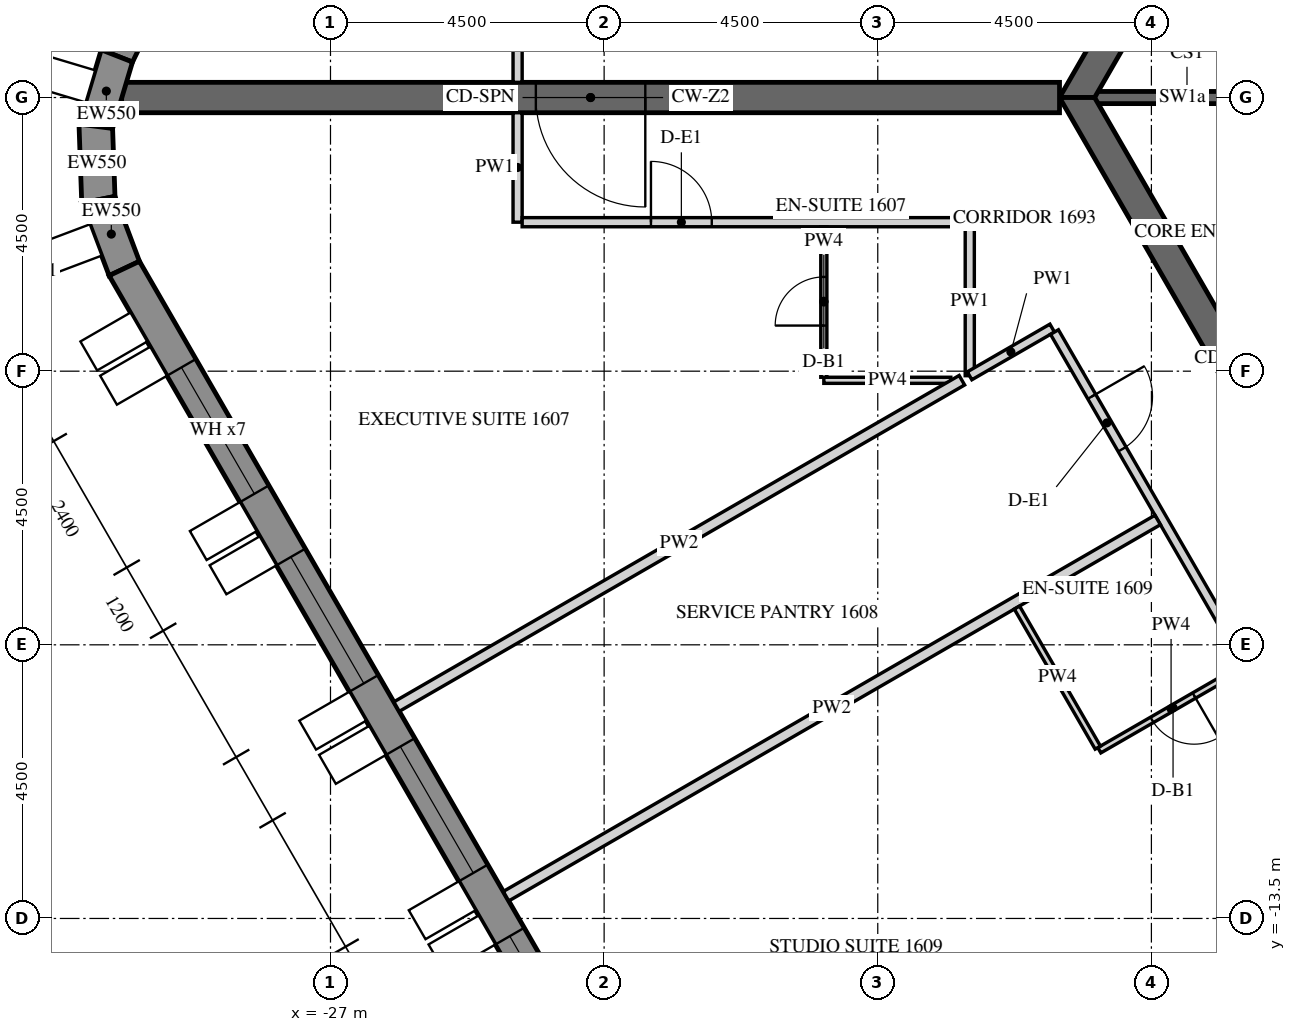
"""IFC4 building model, lengths in metres.
Left out: names, types, materials, properties, quantities, classifications, styles, units other than length and angle.
Written with IfcOpenShell. Run it as: python <this file> out.ifc"""

import sys

from ifc_helpers import new_model, si_unit, direction, frame, frame_2d, origin, place, context, subcontext, project, spatial, polyline, rectangle, outline, extrude, element, fill, save


model = new_model("IFC4")
c1 = context("Model", 3, precision=1e-05, world=origin(), true_north=direction((0.0, 1.0)))
c2 = subcontext(c1, "Body", "Model", "MODEL_VIEW")
j1 = project(units=[si_unit("LENGTHUNIT", "METRE"), si_unit("PLANEANGLEUNIT", "RADIAN")], contexts=[c1])
p1 = place(None, origin())
s1 = spatial("IfcSite", under=j1, at=p1, CompositionType="ELEMENT")
p2 = place(p1, origin())
s2 = spatial("IfcBuilding", under=s1, at=p2, CompositionType="ELEMENT")
p3 = place(p2, frame((0.0, 0.0, 207.3)))
s3 = spatial("IfcBuildingStorey", under=s2, at=p3, CompositionType="ELEMENT", Elevation=207.3)
p4 = place(p3, frame((-18.345, 25.633, -0.15), z_axis=(0.0, 0.0, 1.0), x_axis=(-0.43837181828, -0.898793718791, 0.0)))
e1 = element("IfcWall", 1, at=p4, inside=s3, PredefinedType="SOLIDWALL", context=c2, shape_type="SweptSolid", body=[
    extrude(outline(polyline([(-0.026, -0.275), (27.78, -0.275), (27.735, 0.275), (0.026, 0.275), (-0.026, -0.275)])), origin(), (0.0, 0.0, 1.0), 3.9),
])
p5 = place(p4, frame((1.879, 0.0, 1.05)))
e2 = element("IfcOpeningElement", 2, at=p5, cuts=e1, PredefinedType="OPENING", context=c2, shape_type="SweptSolid", body=[
    extrude(rectangle(XDim=2.4, YDim=2.4, at=frame_2d((1.2, 1.2))), frame((0.0, 0.285, 0.0), z_axis=(0.0, -1.0, 0.0), x_axis=(1.0, 0.0, 0.0)), (0.0, 0.0, 1.0), 0.57),
])
p6 = place(p4, frame((5.479, 0.0, 1.05)))
e3 = element("IfcOpeningElement", 3, at=p6, cuts=e1, PredefinedType="OPENING", context=c2, shape_type="SweptSolid", body=[
    extrude(rectangle(XDim=2.4, YDim=2.4, at=frame_2d((1.2, 1.2))), frame((0.0, 0.285, 0.0), z_axis=(0.0, -1.0, 0.0), x_axis=(1.0, 0.0, 0.0)), (0.0, 0.0, 1.0), 0.57),
])
p7 = place(p4, frame((9.079, 0.0, 1.05)))
e4 = element("IfcOpeningElement", 4, at=p7, cuts=e1, PredefinedType="OPENING", context=c2, shape_type="SweptSolid", body=[
    extrude(rectangle(XDim=2.4, YDim=2.4, at=frame_2d((1.2, 1.2))), frame((0.0, 0.285, 0.0), z_axis=(0.0, -1.0, 0.0), x_axis=(1.0, 0.0, 0.0)), (0.0, 0.0, 1.0), 0.57),
])
p8 = place(p4, frame((12.679, 0.0, 1.05)))
e5 = element("IfcOpeningElement", 5, at=p8, cuts=e1, PredefinedType="OPENING", context=c2, shape_type="SweptSolid", body=[
    extrude(rectangle(XDim=2.4, YDim=2.4, at=frame_2d((1.2, 1.2))), frame((0.0, 0.285, 0.0), z_axis=(0.0, -1.0, 0.0), x_axis=(1.0, 0.0, 0.0)), (0.0, 0.0, 1.0), 0.57),
])
p9 = place(p4, frame((16.279, 0.0, 1.05)))
e6 = element("IfcOpeningElement", 6, at=p9, cuts=e1, PredefinedType="OPENING", context=c2, shape_type="SweptSolid", body=[
    extrude(rectangle(XDim=2.4, YDim=2.4, at=frame_2d((1.2, 1.2))), frame((0.0, 0.285, 0.0), z_axis=(0.0, -1.0, 0.0), x_axis=(1.0, 0.0, 0.0)), (0.0, 0.0, 1.0), 0.57),
])
p10 = place(p4, frame((19.879, 0.0, 1.05)))
e7 = element("IfcOpeningElement", 7, at=p10, cuts=e1, PredefinedType="OPENING", context=c2, shape_type="SweptSolid", body=[
    extrude(rectangle(XDim=2.4, YDim=2.4, at=frame_2d((1.2, 1.2))), frame((0.0, 0.285, 0.0), z_axis=(0.0, -1.0, 0.0), x_axis=(1.0, 0.0, 0.0)), (0.0, 0.0, 1.0), 0.57),
])
p11 = place(p4, frame((23.479, 0.0, 1.05)))
e8 = element("IfcOpeningElement", 8, at=p11, cuts=e1, PredefinedType="OPENING", context=c2, shape_type="SweptSolid", body=[
    extrude(rectangle(XDim=2.4, YDim=2.4, at=frame_2d((1.2, 1.2))), frame((0.0, 0.285, 0.0), z_axis=(0.0, -1.0, 0.0), x_axis=(1.0, 0.0, 0.0)), (0.0, 0.0, 1.0), 0.57),
])
p12 = place(p3, frame((-30.513, 0.684, -0.15), z_axis=(0.0, 0.0, 1.0), x_axis=(-0.286736058109, -0.958009620505, 0.0)))
e9 = element("IfcWall", 9, at=p12, inside=s3, PredefinedType="SOLIDWALL", context=c2, shape_type="SweptSolid", body=[
    extrude(outline(polyline([(-0.022, -0.275), (1.253, -0.275), (1.163, 0.275), (0.022, 0.275), (-0.022, -0.275)])), origin(), (0.0, 0.0, 1.0), 3.9),
])
p13 = place(p3, frame((-30.86, -0.473, -0.15), z_axis=(0.0, 0.0, 1.0), x_axis=(0.03495638276, -0.999388838893, 0.0)))
e10 = element("IfcWall", 10, at=p13, inside=s3, PredefinedType="SOLIDWALL", context=c2, shape_type="SweptSolid", body=[
    extrude(outline(polyline([(-0.045, -0.275), (1.253, -0.275), (1.163, 0.275), (0.045, 0.275), (-0.045, -0.275)])), origin(), (0.0, 0.0, 1.0), 3.9),
])
p14 = place(p3, frame((-30.817, -1.681, -0.15), z_axis=(0.0, 0.0, 1.0), x_axis=(0.352850303963, -0.935679786569, 0.0)))
e11 = element("IfcWall", 11, at=p14, inside=s3, PredefinedType="SOLIDWALL", context=c2, shape_type="SweptSolid", body=[
    extrude(outline(polyline([(-0.045, -0.275), (1.23, -0.275), (1.186, 0.275), (0.045, 0.275), (-0.045, -0.275)])), origin(), (0.0, 0.0, 1.0), 3.9),
])
p15 = place(p3, frame((-30.391, -2.811, -0.15), z_axis=(0.0, 0.0, 1.0), x_axis=(0.499998569178, -0.866026229868, 0.0)))
e12 = element("IfcWall", 12, at=p15, inside=s3, PredefinedType="SOLIDWALL", context=c2, shape_type="SweptSolid", body=[
    extrude(outline(polyline([(-0.022, -0.275), (27.783, -0.275), (27.732, 0.275), (0.022, 0.275), (-0.022, -0.275)])), origin(), (0.0, 0.0, 1.0), 3.9),
])
p16 = place(p15, frame((1.879, 0.0, 1.05)))
e13 = element("IfcOpeningElement", 13, at=p16, cuts=e12, PredefinedType="OPENING", context=c2, shape_type="SweptSolid", body=[
    extrude(rectangle(XDim=2.4, YDim=2.4, at=frame_2d((1.2, 1.2))), frame((0.0, 0.285, 0.0), z_axis=(0.0, -1.0, 0.0), x_axis=(1.0, 0.0, 0.0)), (0.0, 0.0, 1.0), 0.57),
])
p17 = place(p15, frame((5.479, 0.0, 1.05)))
e14 = element("IfcOpeningElement", 14, at=p17, cuts=e12, PredefinedType="OPENING", context=c2, shape_type="SweptSolid", body=[
    extrude(rectangle(XDim=2.4, YDim=2.4, at=frame_2d((1.2, 1.2))), frame((0.0, 0.285, 0.0), z_axis=(0.0, -1.0, 0.0), x_axis=(1.0, 0.0, 0.0)), (0.0, 0.0, 1.0), 0.57),
])
p18 = place(p15, frame((9.079, 0.0, 1.05)))
e15 = element("IfcOpeningElement", 15, at=p18, cuts=e12, PredefinedType="OPENING", context=c2, shape_type="SweptSolid", body=[
    extrude(rectangle(XDim=2.4, YDim=2.4, at=frame_2d((1.2, 1.2))), frame((0.0, 0.285, 0.0), z_axis=(0.0, -1.0, 0.0), x_axis=(1.0, 0.0, 0.0)), (0.0, 0.0, 1.0), 0.57),
])
p19 = place(p15, frame((12.679, 0.0, 1.05)))
e16 = element("IfcOpeningElement", 16, at=p19, cuts=e12, PredefinedType="OPENING", context=c2, shape_type="SweptSolid", body=[
    extrude(rectangle(XDim=2.4, YDim=2.4, at=frame_2d((1.2, 1.2))), frame((0.0, 0.285, 0.0), z_axis=(0.0, -1.0, 0.0), x_axis=(1.0, 0.0, 0.0)), (0.0, 0.0, 1.0), 0.57),
])
p20 = place(p15, frame((16.279, 0.0, 1.05)))
e17 = element("IfcOpeningElement", 17, at=p20, cuts=e12, PredefinedType="OPENING", context=c2, shape_type="SweptSolid", body=[
    extrude(rectangle(XDim=2.4, YDim=2.4, at=frame_2d((1.2, 1.2))), frame((0.0, 0.285, 0.0), z_axis=(0.0, -1.0, 0.0), x_axis=(1.0, 0.0, 0.0)), (0.0, 0.0, 1.0), 0.57),
])
p21 = place(p15, frame((19.879, 0.0, 1.05)))
e18 = element("IfcOpeningElement", 18, at=p21, cuts=e12, PredefinedType="OPENING", context=c2, shape_type="SweptSolid", body=[
    extrude(rectangle(XDim=2.4, YDim=2.4, at=frame_2d((1.2, 1.2))), frame((0.0, 0.285, 0.0), z_axis=(0.0, -1.0, 0.0), x_axis=(1.0, 0.0, 0.0)), (0.0, 0.0, 1.0), 0.57),
])
p22 = place(p15, frame((23.479, 0.0, 1.05)))
e19 = element("IfcOpeningElement", 19, at=p22, cuts=e12, PredefinedType="OPENING", context=c2, shape_type="SweptSolid", body=[
    extrude(rectangle(XDim=2.4, YDim=2.4, at=frame_2d((1.2, 1.2))), frame((0.0, 0.285, 0.0), z_axis=(0.0, -1.0, 0.0), x_axis=(1.0, 0.0, 0.0)), (0.0, 0.0, 1.0), 0.57),
])
p23 = place(p3, frame((-7.361, 12.75, -0.15), z_axis=(0.0, 0.0, 1.0), x_axis=(-0.50000571537, -0.866022103989, 0.0)))
e20 = element("IfcWall", 20, at=p23, inside=s3, PredefinedType="SHEAR", context=c2, shape_type="SweptSolid", body=[
    extrude(outline(polyline([(-0.144, -0.25), (14.867, -0.25), (14.578, 0.25), (0.144, 0.25), (-0.144, -0.25)])), origin(), (0.0, 0.0, 1.0), 3.9),
])
p24 = place(p23, frame((6.49, 0.0, 0.15)))
e21 = element("IfcOpeningElement", 21, at=p24, cuts=e20, PredefinedType="OPENING", context=c2, shape_type="SweptSolid", body=[
    extrude(rectangle(XDim=1.8, YDim=2.4, at=frame_2d((0.9, 1.2))), frame((0.0, 0.26, 0.0), z_axis=(0.0, -1.0, 0.0), x_axis=(1.0, 0.0, 0.0)), (0.0, 0.0, 1.0), 0.52),
])
p25 = place(p3, frame((-14.722, 0.0, -0.15), z_axis=(0.0, 0.0, 1.0), x_axis=(0.50000571537, -0.866022103989, 0.0)))
e22 = element("IfcWall", 22, at=p25, inside=s3, PredefinedType="SHEAR", context=c2, shape_type="SweptSolid", body=[
    extrude(outline(polyline([(-0.144, -0.25), (14.867, -0.25), (14.578, 0.25), (0.144, 0.25), (-0.144, -0.25)])), origin(), (0.0, 0.0, 1.0), 3.9),
])
p26 = place(p25, frame((6.432, 0.0, 0.15)))
e23 = element("IfcOpeningElement", 23, at=p26, cuts=e22, PredefinedType="OPENING", context=c2, shape_type="SweptSolid", body=[
    extrude(rectangle(XDim=1.8, YDim=2.4, at=frame_2d((0.9, 1.2))), frame((0.0, 0.26, 0.0), z_axis=(0.0, -1.0, 0.0), x_axis=(1.0, 0.0, 0.0)), (0.0, 0.0, 1.0), 0.52),
])
p27 = place(p3, frame((-15.011, 0.0, -0.15), z_axis=(0.0, 0.0, 1.0), x_axis=(-1.0, 0.0, 0.0)))
e24 = element("IfcWall", 24, at=p27, inside=s3, PredefinedType="SHEAR", context=c2, shape_type="SweptSolid", body=[
    extrude(rectangle(XDim=15.424, YDim=0.5, at=frame_2d((7.712, 0.0))), origin(), (0.0, 0.0, 1.0), 3.9),
])
p28 = place(p27, frame((6.812, 0.0, 0.15)))
e25 = element("IfcOpeningElement", 25, at=p28, cuts=e24, PredefinedType="OPENING", context=c2, shape_type="SweptSolid", body=[
    extrude(rectangle(XDim=1.8, YDim=2.4, at=frame_2d((0.9, 1.2))), frame((0.0, 0.26, 0.0), z_axis=(0.0, -1.0, 0.0), x_axis=(1.0, 0.0, 0.0)), (0.0, 0.0, 1.0), 0.52),
])
p29 = place(p3, frame((-11.547, 0.0, -0.15), z_axis=(0.0, 0.0, 1.0), x_axis=(-1.0, 0.0, 0.0)))
e26 = element("IfcWall", 26, at=p29, inside=s3, PredefinedType="SHEAR", context=c2, shape_type="SweptSolid", body=[
    extrude(rectangle(XDim=2.887, YDim=0.2, at=frame_2d((1.443, 0.0))), origin(), (0.0, 0.0, 1.0), 3.9),
])
p30 = place(p3, frame((-23.923, 1.975, 0.0), z_axis=(0.0, 0.0, 1.0), x_axis=(0.0, -1.0, 0.0)))
e27 = element("IfcWall", 27, at=p30, inside=s3, PredefinedType="PARTITIONING", context=c2, shape_type="SweptSolid", body=[
    extrude(rectangle(XDim=1.725, YDim=0.15, at=frame_2d((0.863, 0.0))), origin(), (0.0, 0.0, 1.0), 2.988),
])
p31 = place(p3, frame((-23.923, -0.25, 0.0), z_axis=(0.0, 0.0, 1.0), x_axis=(0.0, -1.0, 0.0)))
e28 = element("IfcWall", 28, at=p31, inside=s3, PredefinedType="PARTITIONING", context=c2, shape_type="SweptSolid", body=[
    extrude(rectangle(XDim=1.8, YDim=0.15, at=frame_2d((0.9, 0.0))), origin(), (0.0, 0.0, 1.0), 2.988),
])
p32 = place(p3, frame((-23.848, -2.05, 0.0), z_axis=(0.0, 0.0, 1.0), x_axis=(1.0, 0.0, 0.0)))
e29 = element("IfcWall", 29, at=p32, inside=s3, PredefinedType="PARTITIONING", context=c2, shape_type="SweptSolid", body=[
    extrude(rectangle(XDim=7.361, YDim=0.15, at=frame_2d((3.68, 0.0))), origin(), (0.0, 0.0, 1.0), 2.988),
])
p33 = place(p32, frame((2.118, 0.0, 0.0)))
e30 = element("IfcOpeningElement", 30, at=p33, cuts=e29, PredefinedType="OPENING", context=c2, shape_type="SweptSolid", body=[
    extrude(rectangle(XDim=1.0, YDim=2.1, at=frame_2d((0.5, 1.05))), frame((0.0, 0.085, 0.0), z_axis=(0.0, -1.0, 0.0), x_axis=(1.0, 0.0, 0.0)), (0.0, 0.0, 1.0), 0.17),
])
p34 = place(p3, frame((-16.487, -2.125, 0.0), z_axis=(0.0, 0.0, 1.0), x_axis=(0.0, -1.0, 0.0)))
e31 = element("IfcWall", 31, at=p34, inside=s3, PredefinedType="PARTITIONING", context=c2, shape_type="SweptSolid", body=[
    extrude(rectangle(XDim=2.449, YDim=0.15, at=frame_2d((1.225, 0.0))), origin(), (0.0, 0.0, 1.0), 2.988),
])
p35 = place(p3, frame((-16.49, -4.576, 0.0), z_axis=(0.0, 0.0, 1.0), x_axis=(0.865993845424, 0.5000546567, 0.0)))
e32 = element("IfcWall", 32, at=p35, inside=s3, PredefinedType="PARTITIONING", context=c2, shape_type="SweptSolid", body=[
    extrude(rectangle(XDim=1.569, YDim=0.15, at=frame_2d((0.785, 0.0))), origin(), (0.0, 0.0, 1.0), 2.988),
])
p36 = place(p3, frame((-15.094, -3.856, 0.0), z_axis=(0.0, 0.0, 1.0), x_axis=(0.500006037985, -0.866021917724, 0.0)))
e33 = element("IfcWall", 33, at=p36, inside=s3, PredefinedType="PARTITIONING", context=c2, shape_type="SweptSolid", body=[
    extrude(rectangle(XDim=12.867, YDim=0.15, at=frame_2d((6.434, 0.0))), origin(), (0.0, 0.0, 1.0), 2.988),
])
p37 = place(p36, frame((1.225, 0.0, 0.0)))
e34 = element("IfcOpeningElement", 34, at=p37, cuts=e33, PredefinedType="OPENING", context=c2, shape_type="SweptSolid", body=[
    extrude(rectangle(XDim=1.0, YDim=2.1, at=frame_2d((0.5, 1.05))), frame((0.0, 0.085, 0.0), z_axis=(0.0, -1.0, 0.0), x_axis=(1.0, 0.0, 0.0)), (0.0, 0.0, 1.0), 0.17),
])
p38 = place(p36, frame((8.025, 0.0, 0.0)))
e35 = element("IfcOpeningElement", 35, at=p38, cuts=e33, PredefinedType="OPENING", context=c2, shape_type="SweptSolid", body=[
    extrude(rectangle(XDim=1.0, YDim=2.1, at=frame_2d((0.5, 1.05))), frame((0.0, 0.085, 0.0), z_axis=(0.0, -1.0, 0.0), x_axis=(1.0, 0.0, 0.0)), (0.0, 0.0, 1.0), 0.17),
])
p39 = place(p36, frame((11.717, 0.0, 0.0)))
e36 = element("IfcOpeningElement", 36, at=p39, cuts=e33, PredefinedType="OPENING", context=c2, shape_type="SweptSolid", body=[
    extrude(rectangle(XDim=1.0, YDim=2.1, at=frame_2d((0.5, 1.05))), frame((0.0, 0.085, 0.0), z_axis=(0.0, -1.0, 0.0), x_axis=(1.0, 0.0, 0.0)), (0.0, 0.0, 1.0), 0.17),
])
p40 = place(p3, frame((-16.798, -4.65, 0.0), z_axis=(0.0, 0.0, 1.0), x_axis=(-1.0, 0.0, 0.0)))
e37 = element("IfcWall", 37, at=p40, inside=s3, PredefinedType="PARTITIONING", context=c2, shape_type="SweptSolid", body=[
    extrude(rectangle(XDim=2.089, YDim=0.1, at=frame_2d((1.044, 0.0))), origin(), (0.0, 0.0, 1.0), 2.988),
])
p41 = place(p3, frame((-18.887, -4.6, 0.0), z_axis=(0.0, 0.0, 1.0), x_axis=(0.0, 1.0, 0.0)))
e38 = element("IfcWall", 38, at=p41, inside=s3, PredefinedType="PARTITIONING", context=c2, shape_type="SweptSolid", body=[
    extrude(rectangle(XDim=2.475, YDim=0.1, at=frame_2d((1.238, 0.0))), origin(), (0.0, 0.0, 1.0), 2.988),
])
p42 = place(p41, frame((0.85, 0.0, 0.0)))
e39 = element("IfcOpeningElement", 39, at=p42, cuts=e38, PredefinedType="OPENING", context=c2, shape_type="SweptSolid", body=[
    extrude(rectangle(XDim=0.8, YDim=2.1, at=frame_2d((0.4, 1.05))), frame((0.0, 0.06, 0.0), z_axis=(0.0, -1.0, 0.0), x_axis=(1.0, 0.0, 0.0)), (0.0, 0.0, 1.0), 0.12),
])
p43 = place(p3, frame((-25.914, -10.017, 0.0), z_axis=(0.0, 0.0, 1.0), x_axis=(0.86602614826, 0.499998710529, 0.0)))
e40 = element("IfcWall", 40, at=p43, inside=s3, PredefinedType="PARTITIONING", context=c2, shape_type="SweptSolid", body=[
    extrude(rectangle(XDim=10.735, YDim=0.18, at=frame_2d((5.368, 0.0))), origin(), (0.0, 0.0, 1.0), 2.988),
])
p44 = place(p3, frame((-24.114, -13.134, 0.0), z_axis=(0.0, 0.0, 1.0), x_axis=(0.866024931941, 0.500000817256, 0.0)))
e41 = element("IfcWall", 41, at=p44, inside=s3, PredefinedType="PARTITIONING", context=c2, shape_type="SweptSolid", body=[
    extrude(rectangle(XDim=12.375, YDim=0.18, at=frame_2d((6.188, 0.0))), origin(), (0.0, 0.0, 1.0), 2.988),
])
p45 = place(p3, frame((-11.996, -9.372, 0.0), z_axis=(0.0, 0.0, 1.0), x_axis=(-0.866012511928, -0.500022328685, 0.0)))
e42 = element("IfcWall", 42, at=p45, inside=s3, PredefinedType="PARTITIONING", context=c2, shape_type="SweptSolid", body=[
    extrude(rectangle(XDim=2.725, YDim=0.1, at=frame_2d((1.363, 0.0))), origin(), (0.0, 0.0, 1.0), 2.988),
])
p46 = place(p45, frame((0.925, 0.0, 0.0)))
e43 = element("IfcOpeningElement", 43, at=p46, cuts=e42, PredefinedType="OPENING", context=c2, shape_type="SweptSolid", body=[
    extrude(rectangle(XDim=0.8, YDim=2.1, at=frame_2d((0.4, 1.05))), frame((0.0, 0.06, 0.0), z_axis=(0.0, -1.0, 0.0), x_axis=(1.0, 0.0, 0.0)), (0.0, 0.0, 1.0), 0.12),
])
p47 = place(p3, frame((-14.381, -10.691, 0.0), z_axis=(0.0, 0.0, 1.0), x_axis=(-0.500008456887, 0.866020521143, 0.0)))
e44 = element("IfcWall", 44, at=p47, inside=s3, PredefinedType="PARTITIONING", context=c2, shape_type="SweptSolid", body=[
    extrude(rectangle(XDim=2.66, YDim=0.1, at=frame_2d((1.33, 0.0))), origin(), (0.0, 0.0, 1.0), 2.988),
])
p48 = place(p3, frame((-20.513, -19.37, 0.0), z_axis=(0.0, 0.0, 1.0), x_axis=(0.866024931941, 0.500000817256, 0.0)))
e45 = element("IfcWall", 45, at=p48, inside=s3, PredefinedType="PARTITIONING", context=c2, shape_type="SweptSolid", body=[
    extrude(rectangle(XDim=12.375, YDim=0.18, at=frame_2d((6.188, 0.0))), origin(), (0.0, 0.0, 1.0), 2.988),
])
p49 = place(p16, frame((0.0, 0.205, 0.0)))
e46 = element("IfcWindow", 46, at=p49, inside=s3, PartitioningType="DOUBLE_PANEL_VERTICAL", PredefinedType="WINDOW", context=c2, shape_type="SweptSolid", body=[
    extrude(rectangle(XDim=2.4, YDim=2.4, at=frame_2d((1.2, 1.2))), frame((0.0, 0.03, 0.0), z_axis=(0.0, -1.0, 0.0), x_axis=(1.0, 0.0, 0.0)), (0.0, 0.0, 1.0), 0.06),
])
fill(e13, e46)
p50 = place(p17, frame((0.0, 0.205, 0.0)))
e47 = element("IfcWindow", 47, at=p50, inside=s3, PartitioningType="DOUBLE_PANEL_VERTICAL", PredefinedType="WINDOW", context=c2, shape_type="SweptSolid", body=[
    extrude(rectangle(XDim=2.4, YDim=2.4, at=frame_2d((1.2, 1.2))), frame((0.0, 0.03, 0.0), z_axis=(0.0, -1.0, 0.0), x_axis=(1.0, 0.0, 0.0)), (0.0, 0.0, 1.0), 0.06),
])
fill(e14, e47)
p51 = place(p18, frame((0.0, 0.205, 0.0)))
e48 = element("IfcWindow", 48, at=p51, inside=s3, PartitioningType="DOUBLE_PANEL_VERTICAL", PredefinedType="WINDOW", context=c2, shape_type="SweptSolid", body=[
    extrude(rectangle(XDim=2.4, YDim=2.4, at=frame_2d((1.2, 1.2))), frame((0.0, 0.03, 0.0), z_axis=(0.0, -1.0, 0.0), x_axis=(1.0, 0.0, 0.0)), (0.0, 0.0, 1.0), 0.06),
])
fill(e15, e48)
p52 = place(p19, frame((0.0, 0.205, 0.0)))
e49 = element("IfcWindow", 49, at=p52, inside=s3, PartitioningType="DOUBLE_PANEL_VERTICAL", PredefinedType="WINDOW", context=c2, shape_type="SweptSolid", body=[
    extrude(rectangle(XDim=2.4, YDim=2.4, at=frame_2d((1.2, 1.2))), frame((0.0, 0.03, 0.0), z_axis=(0.0, -1.0, 0.0), x_axis=(1.0, 0.0, 0.0)), (0.0, 0.0, 1.0), 0.06),
])
fill(e16, e49)
p53 = place(p28, origin())
e50 = element("IfcDoor", 50, at=p53, inside=s3, OperationType="DOUBLE_DOOR_SINGLE_SWING", PredefinedType="DOOR", context=c2, shape_type="SweptSolid", body=[
    extrude(rectangle(XDim=1.8, YDim=2.4, at=frame_2d((0.9, 1.2))), frame((0.0, 0.025, 0.0), z_axis=(0.0, -1.0, 0.0), x_axis=(1.0, 0.0, 0.0)), (0.0, 0.0, 1.0), 0.05),
])
fill(e25, e50)
p54 = place(p33, origin())
e51 = element("IfcDoor", 51, at=p54, inside=s3, OperationType="SINGLE_SWING_LEFT", PredefinedType="DOOR", context=c2, shape_type="SweptSolid", body=[
    extrude(rectangle(XDim=1.0, YDim=2.1, at=frame_2d((0.5, 1.05))), frame((0.0, 0.025, 0.0), z_axis=(0.0, -1.0, 0.0), x_axis=(1.0, 0.0, 0.0)), (0.0, 0.0, 1.0), 0.05),
])
fill(e30, e51)
p55 = place(p42, origin())
e52 = element("IfcDoor", 52, at=p55, inside=s3, OperationType="SINGLE_SWING_RIGHT", PredefinedType="DOOR", context=c2, shape_type="SweptSolid", body=[
    extrude(rectangle(XDim=0.8, YDim=2.1, at=frame_2d((0.4, 1.05))), frame((0.0, 0.025, 0.0), z_axis=(0.0, -1.0, 0.0), x_axis=(1.0, 0.0, 0.0)), (0.0, 0.0, 1.0), 0.05),
])
fill(e39, e52)
p56 = place(p37, origin())
e53 = element("IfcDoor", 53, at=p56, inside=s3, OperationType="SINGLE_SWING_RIGHT", PredefinedType="DOOR", context=c2, shape_type="SweptSolid", body=[
    extrude(rectangle(XDim=1.0, YDim=2.1, at=frame_2d((0.5, 1.05))), frame((0.0, 0.025, 0.0), z_axis=(0.0, -1.0, 0.0), x_axis=(1.0, 0.0, 0.0)), (0.0, 0.0, 1.0), 0.05),
])
fill(e34, e53)
p57 = place(p46, origin())
e54 = element("IfcDoor", 54, at=p57, inside=s3, OperationType="SINGLE_SWING_RIGHT", PredefinedType="DOOR", context=c2, shape_type="SweptSolid", body=[
    extrude(rectangle(XDim=0.8, YDim=2.1, at=frame_2d((0.4, 1.05))), frame((0.0, 0.025, 0.0), z_axis=(0.0, -1.0, 0.0), x_axis=(1.0, 0.0, 0.0)), (0.0, 0.0, 1.0), 0.05),
])
fill(e43, e54)
save(model, sys.argv[1])
